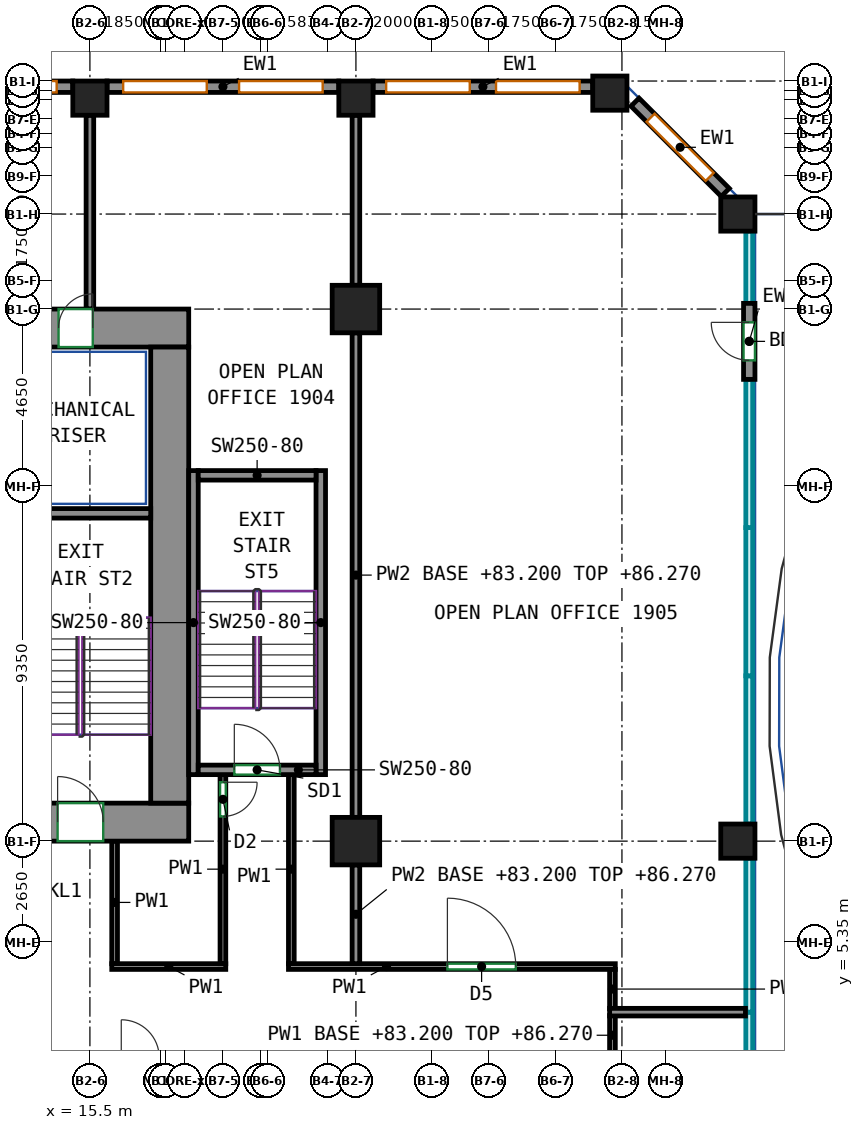
"""IFC4 building model, lengths in metres.
Left out: names, types, materials, properties, quantities, classifications, styles, units other than length and angle.
Written with IfcOpenShell. Run it as: python <this file> out.ifc"""

import sys

from ifc_helpers import new_model, si_unit, direction, frame, frame_2d, origin, origin_2d, place, context, subcontext, project, spatial, rectangle, extrude, source, transform, mapped, element, fill, save


model = new_model("IFC4")
c1 = context("Model", 3, precision=1e-05, world=origin(), true_north=direction((0.0, 1.0)))
c2 = subcontext(c1, "Body", "Model", "MODEL_VIEW")
j1 = project(units=[si_unit("LENGTHUNIT", "METRE"), si_unit("PLANEANGLEUNIT", "RADIAN")], contexts=[c1])
p1 = place(None, origin())
s1 = spatial("IfcSite", under=j1, at=p1, CompositionType="ELEMENT")
p2 = place(p1, origin())
s2 = spatial("IfcBuilding", under=s1, at=p2, CompositionType="ELEMENT")
p3 = place(p2, frame((0.0, 0.0, 83.2)))
s3 = spatial("IfcBuildingStorey", under=s2, at=p3, CompositionType="ELEMENT", Elevation=83.2)
m1 = source(origin(), c2, "Body", "SweptSolid", [
    extrude(rectangle(XDim=0.9, YDim=0.9, at=origin_2d()), origin(), (0.0, 0.0, 1.0), 3.72),
])
p4 = place(p3, frame((15.5, 27.55, 0.0), z_axis=(0.0, 0.0, 1.0), x_axis=(1.0, 0.0, 0.0)))
e1 = element("IfcColumn", 1, at=p4, inside=s3, PredefinedType="COLUMN", context=c2, shape_type="MappedRepresentation", body=[
    mapped(m1, transform((0.0, 0.0, 0.0))),
])
m2 = source(origin(), c2, "Body", "SweptSolid", [
    extrude(rectangle(XDim=1.25, YDim=1.25, at=origin_2d()), origin(), (0.0, 0.0, 1.0), 3.72),
])
for number, where, z_axis, x_axis in (
    (2, (22.5, 8.0, 0.0), (0.0, 0.0, 1.0), (1.0, 0.0, 0.0)),
    (3, (22.5, 22.0, 0.0), (0.0, 0.0, 1.0), (1.0, 0.0, 0.0)),
):
    element("IfcColumn", number, at=place(p3, frame(where, z_axis=z_axis, x_axis=x_axis)), inside=s3, PredefinedType="COLUMN", context=c2, shape_type="MappedRepresentation", body=[
        mapped(m2, transform((0.0, 0.0, 0.0))),
    ])
for number, where, z_axis, x_axis in (
    (4, (22.5, 27.55, 0.0), (0.0, 0.0, 1.0), (1.0, 0.0, 0.0)),
    (5, (29.182, 27.682, 0.0), (0.0, 0.0, 1.0), (1.0, 0.0, 0.0)),
    (6, (32.55, 8.0, 0.0), (0.0, 0.0, 1.0), (1.0, 0.0, 0.0)),
    (7, (32.55, 24.5, 0.0), (0.0, 0.0, 1.0), (1.0, 0.0, 0.0)),
):
    element("IfcColumn", number, at=place(p3, frame(where, z_axis=z_axis, x_axis=x_axis)), inside=s3, PredefinedType="COLUMN", context=c2, shape_type="MappedRepresentation", body=[
        mapped(m1, transform((0.0, 0.0, 0.0))),
    ])
m3 = source(origin(), c2, "Body", "SweptSolid", [
    extrude(rectangle(XDim=5.63, YDim=1.0, at=frame_2d((2.815, 0.0))), origin(), (0.0, 0.0, 1.0), 3.72),
])
p5 = place(p3, frame((12.47, 8.5, 0.0), z_axis=(0.0, 0.0, 1.0), x_axis=(1.0, 0.0, 0.0)))
e8 = element("IfcWall", 8, at=p5, inside=s3, PredefinedType="SHEAR", context=c2, shape_type="MappedRepresentation", body=[
    mapped(m3, transform((0.0, 0.0, 0.0))),
])
p6 = place(p5, frame((2.18, 0.0, 0.0)))
e9 = element("IfcOpeningElement", 9, at=p6, cuts=e8, PredefinedType="OPENING", context=c2, shape_type="SweptSolid", body=[
    extrude(rectangle(XDim=1.2, YDim=2.1, at=frame_2d((0.6, 1.05))), frame((0.0, 0.51, 0.0), z_axis=(0.0, -1.0, 0.0), x_axis=(1.0, 0.0, 0.0)), (0.0, 0.0, 1.0), 1.02),
])
m4 = source(origin(), c2, "Body", "SweptSolid", [
    extrude(rectangle(XDim=34.1, YDim=1.0, at=frame_2d((17.05, 0.0))), origin(), (0.0, 0.0, 1.0), 3.72),
])
p7 = place(p3, frame((-16.0, 21.5, 0.0), z_axis=(0.0, 0.0, 1.0), x_axis=(1.0, 0.0, 0.0)))
e10 = element("IfcWall", 10, at=p7, inside=s3, PredefinedType="SHEAR", context=c2, shape_type="MappedRepresentation", body=[
    mapped(m4, transform((0.0, 0.0, 0.0))),
])
p8 = place(p7, frame((6.831, 0.0, 0.0)))
e11 = element("IfcOpeningElement", 11, at=p8, cuts=e10, PredefinedType="OPENING", context=c2, shape_type="SweptSolid", body=[
    extrude(rectangle(XDim=0.9, YDim=2.1, at=frame_2d((0.45, 1.05))), frame((0.0, 0.51, 0.0), z_axis=(0.0, -1.0, 0.0), x_axis=(1.0, 0.0, 0.0)), (0.0, 0.0, 1.0), 1.02),
])
p9 = place(p7, frame((12.138, 0.0, 0.0)))
e12 = element("IfcOpeningElement", 12, at=p9, cuts=e10, PredefinedType="OPENING", context=c2, shape_type="SweptSolid", body=[
    extrude(rectangle(XDim=0.9, YDim=2.1, at=frame_2d((0.45, 1.05))), frame((0.0, 0.51, 0.0), z_axis=(0.0, -1.0, 0.0), x_axis=(1.0, 0.0, 0.0)), (0.0, 0.0, 1.0), 1.02),
])
p10 = place(p7, frame((17.565, 0.0, 0.0)))
e13 = element("IfcOpeningElement", 13, at=p10, cuts=e10, PredefinedType="OPENING", context=c2, shape_type="SweptSolid", body=[
    extrude(rectangle(XDim=0.9, YDim=2.1, at=frame_2d((0.45, 1.05))), frame((0.0, 0.51, 0.0), z_axis=(0.0, -1.0, 0.0), x_axis=(1.0, 0.0, 0.0)), (0.0, 0.0, 1.0), 1.02),
])
p11 = place(p7, frame((21.786, 0.0, 0.0)))
e14 = element("IfcOpeningElement", 14, at=p11, cuts=e10, PredefinedType="OPENING", context=c2, shape_type="SweptSolid", body=[
    extrude(rectangle(XDim=0.9, YDim=2.1, at=frame_2d((0.45, 1.05))), frame((0.0, 0.51, 0.0), z_axis=(0.0, -1.0, 0.0), x_axis=(1.0, 0.0, 0.0)), (0.0, 0.0, 1.0), 1.02),
])
p12 = place(p7, frame((26.127, 0.0, 0.0)))
e15 = element("IfcOpeningElement", 15, at=p12, cuts=e10, PredefinedType="OPENING", context=c2, shape_type="SweptSolid", body=[
    extrude(rectangle(XDim=0.9, YDim=2.1, at=frame_2d((0.45, 1.05))), frame((0.0, 0.51, 0.0), z_axis=(0.0, -1.0, 0.0), x_axis=(1.0, 0.0, 0.0)), (0.0, 0.0, 1.0), 1.02),
])
p13 = place(p7, frame((2.525, 0.0, 0.0)))
e16 = element("IfcOpeningElement", 16, at=p13, cuts=e10, PredefinedType="OPENING", context=c2, shape_type="SweptSolid", body=[
    extrude(rectangle(XDim=0.9, YDim=2.1, at=frame_2d((0.45, 1.05))), frame((0.0, 0.51, 0.0), z_axis=(0.0, -1.0, 0.0), x_axis=(1.0, 0.0, 0.0)), (0.0, 0.0, 1.0), 1.02),
])
p14 = place(p7, frame((30.675, 0.0, 0.0)))
e17 = element("IfcOpeningElement", 17, at=p14, cuts=e10, PredefinedType="OPENING", context=c2, shape_type="SweptSolid", body=[
    extrude(rectangle(XDim=0.9, YDim=2.1, at=frame_2d((0.45, 1.05))), frame((0.0, 0.51, 0.0), z_axis=(0.0, -1.0, 0.0), x_axis=(1.0, 0.0, 0.0)), (0.0, 0.0, 1.0), 1.02),
])
m5 = source(origin(), c2, "Body", "SweptSolid", [
    extrude(rectangle(XDim=12.0, YDim=1.0, at=frame_2d((6.0, 0.0))), origin(), (0.0, 0.0, 1.0), 3.72),
])
p15 = place(p3, frame((17.6, 9.0, 0.0), z_axis=(0.0, 0.0, 1.0), x_axis=(0.0, 1.0, 0.0)))
e18 = element("IfcWall", 18, at=p15, inside=s3, PredefinedType="SHEAR", context=c2, shape_type="MappedRepresentation", body=[
    mapped(m5, transform((0.0, 0.0, 0.0))),
])
m6 = source(origin(), c2, "Body", "SweptSolid", [
    extrude(rectangle(XDim=3.7, YDim=0.25, at=frame_2d((1.85, 0.0))), origin(), (0.0, 0.0, 1.0), 3.72),
])
p16 = place(p3, frame((13.4, 16.625, 0.0), z_axis=(0.0, 0.0, 1.0), x_axis=(1.0, 0.0, 0.0)))
e19 = element("IfcWall", 19, at=p16, inside=s3, PredefinedType="SHEAR", context=c2, shape_type="MappedRepresentation", body=[
    mapped(m6, transform((0.0, 0.0, 0.0))),
])
m7 = source(origin(), c2, "Body", "SweptSolid", [
    extrude(rectangle(XDim=8.0, YDim=0.25, at=frame_2d((4.0, 0.0))), origin(), (0.0, 0.0, 1.0), 3.72),
])
for number, where, z_axis, x_axis in (
    (20, (18.225, 9.75, 0.0), (0.0, 0.0, 1.0), (0.0, 1.0, 0.0)),
    (21, (21.575, 9.75, 0.0), (0.0, 0.0, 1.0), (0.0, 1.0, 0.0)),
):
    element("IfcWall", number, at=place(p3, frame(where, z_axis=z_axis, x_axis=x_axis)), inside=s3, PredefinedType="SHEAR", context=c2, shape_type="MappedRepresentation", body=[
        mapped(m7, transform((0.0, 0.0, 0.0))),
    ])
m8 = source(origin(), c2, "Body", "SweptSolid", [
    extrude(rectangle(XDim=3.1, YDim=0.25, at=frame_2d((1.55, 0.0))), origin(), (0.0, 0.0, 1.0), 3.72),
])
p17 = place(p3, frame((18.35, 9.875, 0.0), z_axis=(0.0, 0.0, 1.0), x_axis=(1.0, 0.0, 0.0)))
e22 = element("IfcWall", 22, at=p17, inside=s3, PredefinedType="SHEAR", context=c2, shape_type="MappedRepresentation", body=[
    mapped(m8, transform((0.0, 0.0, 0.0))),
])
p18 = place(p17, frame((0.95, 0.0, 0.0)))
e23 = element("IfcOpeningElement", 23, at=p18, cuts=e22, PredefinedType="OPENING", context=c2, shape_type="SweptSolid", body=[
    extrude(rectangle(XDim=1.2, YDim=2.1, at=frame_2d((0.6, 1.05))), frame((0.0, 0.135, 0.0), z_axis=(0.0, -1.0, 0.0), x_axis=(1.0, 0.0, 0.0)), (0.0, 0.0, 1.0), 0.27),
])
p19 = place(p3, frame((18.35, 17.625, 0.0), z_axis=(0.0, 0.0, 1.0), x_axis=(1.0, 0.0, 0.0)))
e24 = element("IfcWall", 24, at=p19, inside=s3, PredefinedType="SHEAR", context=c2, shape_type="MappedRepresentation", body=[
    mapped(m8, transform((0.0, 0.0, 0.0))),
])
m9 = source(origin(), c2, "Body", "SweptSolid", [
    extrude(rectangle(XDim=2.0, YDim=0.3, at=frame_2d((1.0, 0.0))), origin(), (0.0, 0.0, 1.0), 3.72),
])
p20 = place(p3, frame((32.85, 20.15, 0.0), z_axis=(0.0, 0.0, 1.0), x_axis=(0.0, 1.0, 0.0)))
e25 = element("IfcWall", 25, at=p20, inside=s3, PredefinedType="SOLIDWALL", context=c2, shape_type="MappedRepresentation", body=[
    mapped(m9, transform((0.0, 0.0, 0.0))),
])
p21 = place(p20, frame((0.5, 0.0, 0.0)))
e26 = element("IfcOpeningElement", 26, at=p21, cuts=e25, PredefinedType="OPENING", context=c2, shape_type="SweptSolid", body=[
    extrude(rectangle(XDim=1.0, YDim=2.1, at=frame_2d((0.5, 1.05))), frame((0.0, 0.16, 0.0), z_axis=(0.0, -1.0, 0.0), x_axis=(1.0, 0.0, 0.0)), (0.0, 0.0, 1.0), 0.32),
])
m10 = source(origin(), c2, "Body", "SweptSolid", [
    extrude(rectangle(XDim=3.359, YDim=0.3, at=frame_2d((1.679, 0.0))), origin(), (0.0, 0.0, 1.0), 3.72),
])
p22 = place(p3, frame((32.219, 25.069, 0.0), z_axis=(0.0, 0.0, 1.0), x_axis=(-0.707070438228, 0.707143122278, 0.0)))
e27 = element("IfcWall", 27, at=p22, inside=s3, PredefinedType="SOLIDWALL", context=c2, shape_type="MappedRepresentation", body=[
    mapped(m10, transform((0.0, 0.0, 0.0))),
])
p23 = place(p22, frame((0.579, 0.0, 0.7)))
e28 = element("IfcOpeningElement", 28, at=p23, cuts=e27, PredefinedType="OPENING", context=c2, shape_type="SweptSolid", body=[
    extrude(rectangle(XDim=2.2, YDim=2.25, at=frame_2d((1.1, 1.125))), frame((0.0, 0.16, 0.0), z_axis=(0.0, -1.0, 0.0), x_axis=(1.0, 0.0, 0.0)), (0.0, 0.0, 1.0), 0.32),
])
m11 = source(origin(), c2, "Body", "SweptSolid", [
    extrude(rectangle(XDim=5.782, YDim=0.3, at=frame_2d((2.891, 0.0))), origin(), (0.0, 0.0, 1.0), 3.72),
])
p24 = place(p3, frame((28.732, 27.85, 0.0), z_axis=(0.0, 0.0, 1.0), x_axis=(-1.0, 0.0, 0.0)))
e29 = element("IfcWall", 29, at=p24, inside=s3, PredefinedType="SOLIDWALL", context=c2, shape_type="MappedRepresentation", body=[
    mapped(m11, transform((0.0, 0.0, 0.0))),
])
p25 = place(p24, frame((0.345, 0.0, 0.7)))
e30 = element("IfcOpeningElement", 30, at=p25, cuts=e29, PredefinedType="OPENING", context=c2, shape_type="SweptSolid", body=[
    extrude(rectangle(XDim=2.2, YDim=2.25, at=frame_2d((1.1, 1.125))), frame((0.0, 0.16, 0.0), z_axis=(0.0, -1.0, 0.0), x_axis=(1.0, 0.0, 0.0)), (0.0, 0.0, 1.0), 0.32),
])
p26 = place(p24, frame((3.236, 0.0, 0.7)))
e31 = element("IfcOpeningElement", 31, at=p26, cuts=e29, PredefinedType="OPENING", context=c2, shape_type="SweptSolid", body=[
    extrude(rectangle(XDim=2.2, YDim=2.25, at=frame_2d((1.1, 1.125))), frame((0.0, 0.16, 0.0), z_axis=(0.0, -1.0, 0.0), x_axis=(1.0, 0.0, 0.0)), (0.0, 0.0, 1.0), 0.32),
])
m12 = source(origin(), c2, "Body", "SweptSolid", [
    extrude(rectangle(XDim=6.1, YDim=0.3, at=frame_2d((3.05, 0.0))), origin(), (0.0, 0.0, 1.0), 3.72),
])
p27 = place(p3, frame((22.05, 27.85, 0.0), z_axis=(0.0, 0.0, 1.0), x_axis=(-1.0, 0.0, 0.0)))
e32 = element("IfcWall", 32, at=p27, inside=s3, PredefinedType="SOLIDWALL", context=c2, shape_type="MappedRepresentation", body=[
    mapped(m12, transform((0.0, 0.0, 0.0))),
])
p28 = place(p27, frame((0.425, 0.0, 0.7)))
e33 = element("IfcOpeningElement", 33, at=p28, cuts=e32, PredefinedType="OPENING", context=c2, shape_type="SweptSolid", body=[
    extrude(rectangle(XDim=2.2, YDim=2.25, at=frame_2d((1.1, 1.125))), frame((0.0, 0.16, 0.0), z_axis=(0.0, -1.0, 0.0), x_axis=(1.0, 0.0, 0.0)), (0.0, 0.0, 1.0), 0.32),
])
p29 = place(p27, frame((3.475, 0.0, 0.7)))
e34 = element("IfcOpeningElement", 34, at=p29, cuts=e32, PredefinedType="OPENING", context=c2, shape_type="SweptSolid", body=[
    extrude(rectangle(XDim=2.2, YDim=2.25, at=frame_2d((1.1, 1.125))), frame((0.0, 0.16, 0.0), z_axis=(0.0, -1.0, 0.0), x_axis=(1.0, 0.0, 0.0)), (0.0, 0.0, 1.0), 0.32),
])
p30 = place(p3, frame((15.05, 27.85, 0.0), z_axis=(0.0, 0.0, 1.0), x_axis=(-1.0, 0.0, 0.0)))
e35 = element("IfcWall", 35, at=p30, inside=s3, PredefinedType="SOLIDWALL", context=c2, shape_type="MappedRepresentation", body=[
    mapped(m12, transform((0.0, 0.0, 0.0))),
])
p31 = place(p30, frame((0.425, 0.0, 0.7)))
e36 = element("IfcOpeningElement", 36, at=p31, cuts=e35, PredefinedType="OPENING", context=c2, shape_type="SweptSolid", body=[
    extrude(rectangle(XDim=2.2, YDim=2.25, at=frame_2d((1.1, 1.125))), frame((0.0, 0.16, 0.0), z_axis=(0.0, -1.0, 0.0), x_axis=(1.0, 0.0, 0.0)), (0.0, 0.0, 1.0), 0.32),
])
p32 = place(p30, frame((3.475, 0.0, 0.7)))
e37 = element("IfcOpeningElement", 37, at=p32, cuts=e35, PredefinedType="OPENING", context=c2, shape_type="SweptSolid", body=[
    extrude(rectangle(XDim=2.2, YDim=2.25, at=frame_2d((1.1, 1.125))), frame((0.0, 0.16, 0.0), z_axis=(0.0, -1.0, 0.0), x_axis=(1.0, 0.0, 0.0)), (0.0, 0.0, 1.0), 0.32),
])
p33 = place(p3, frame((16.15, 4.775, 0.0), z_axis=(0.0, 0.0, 1.0), x_axis=(0.0, 1.0, 0.0)))
e38 = element("IfcWall", 38, at=p33, inside=s3, PredefinedType="PARTITIONING", context=c2, shape_type="SweptSolid", body=[
    extrude(rectangle(XDim=3.225, YDim=0.15, at=frame_2d((1.613, 0.0))), origin(), (0.0, 0.0, 1.0), 3.72),
])
p34 = place(p3, frame((16.075, 4.7, 0.0), z_axis=(0.0, 0.0, 1.0), x_axis=(1.0, 0.0, 0.0)))
e39 = element("IfcWall", 39, at=p34, inside=s3, PredefinedType="PARTITIONING", context=c2, shape_type="SweptSolid", body=[
    extrude(rectangle(XDim=3.0, YDim=0.15, at=frame_2d((1.5, 0.0))), origin(), (0.0, 0.0, 1.0), 3.72),
])
p35 = place(p3, frame((19.0, 9.75, 0.0), z_axis=(0.0, 0.0, 1.0), x_axis=(0.0, -1.0, 0.0)))
e40 = element("IfcWall", 40, at=p35, inside=s3, PredefinedType="PARTITIONING", context=c2, shape_type="SweptSolid", body=[
    extrude(rectangle(XDim=4.975, YDim=0.15, at=frame_2d((2.488, 0.0))), origin(), (0.0, 0.0, 1.0), 3.72),
])
p36 = place(p35, frame((0.2, 0.0, 0.0)))
e41 = element("IfcOpeningElement", 41, at=p36, cuts=e40, PredefinedType="OPENING", context=c2, shape_type="SweptSolid", body=[
    extrude(rectangle(XDim=0.9, YDim=2.1, at=frame_2d((0.45, 1.05))), frame((0.0, 0.085, 0.0), z_axis=(0.0, -1.0, 0.0), x_axis=(1.0, 0.0, 0.0)), (0.0, 0.0, 1.0), 0.17),
])
p37 = place(p3, frame((20.8, 4.775, 0.0), z_axis=(0.0, 0.0, 1.0), x_axis=(0.0, 1.0, 0.0)))
e42 = element("IfcWall", 42, at=p37, inside=s3, PredefinedType="PARTITIONING", context=c2, shape_type="SweptSolid", body=[
    extrude(rectangle(XDim=4.975, YDim=0.15, at=frame_2d((2.488, 0.0))), origin(), (0.0, 0.0, 1.0), 3.72),
])
p38 = place(p3, frame((20.725, 4.7, 0.0), z_axis=(0.0, 0.0, 1.0), x_axis=(1.0, 0.0, 0.0)))
e43 = element("IfcWall", 43, at=p38, inside=s3, PredefinedType="PARTITIONING", context=c2, shape_type="SweptSolid", body=[
    extrude(rectangle(XDim=8.6, YDim=0.15, at=frame_2d((4.3, 0.0))), origin(), (0.0, 0.0, 1.0), 3.72),
])
p39 = place(p38, frame((4.182, 0.0, 0.0)))
e44 = element("IfcOpeningElement", 44, at=p39, cuts=e43, PredefinedType="OPENING", context=c2, shape_type="SweptSolid", body=[
    extrude(rectangle(XDim=1.8, YDim=2.1, at=frame_2d((0.9, 1.05))), frame((0.0, 0.085, 0.0), z_axis=(0.0, -1.0, 0.0), x_axis=(1.0, 0.0, 0.0)), (0.0, 0.0, 1.0), 0.17),
])
for number, where, z_axis, x_axis in (
    (45, (29.25, 3.59, 0.0), (0.0, 0.0, 1.0), (0.0, 1.0, 0.0)),
    (46, (29.25, 2.375, 0.0), (0.0, 0.0, 1.0), (0.0, 1.0, 0.0)),
):
    element("IfcWall", number, at=place(p3, frame(where, z_axis=z_axis, x_axis=x_axis)), inside=s3, PredefinedType="PARTITIONING", context=c2, shape_type="SweptSolid", body=[
        extrude(rectangle(XDim=1.035, YDim=0.15, at=frame_2d((0.518, 0.0))), origin(), (0.0, 0.0, 1.0), 3.07),
    ])
p40 = place(p3, frame((15.5, 22.0, 0.0), z_axis=(0.0, 0.0, 1.0), x_axis=(0.0, 1.0, 0.0)))
e47 = element("IfcWall", 47, at=p40, inside=s3, PredefinedType="PARTITIONING", context=c2, shape_type="SweptSolid", body=[
    extrude(rectangle(XDim=5.1, YDim=0.2, at=frame_2d((2.55, 0.0))), origin(), (0.0, 0.0, 1.0), 3.72),
])
p41 = place(p3, frame((22.5, 22.625, 0.0), z_axis=(0.0, 0.0, 1.0), x_axis=(0.0, 1.0, 0.0)))
e48 = element("IfcWall", 48, at=p41, inside=s3, PredefinedType="PARTITIONING", context=c2, shape_type="SweptSolid", body=[
    extrude(rectangle(XDim=4.475, YDim=0.2, at=frame_2d((2.238, 0.0))), origin(), (0.0, 0.0, 1.0), 3.72),
])
p42 = place(p3, frame((22.5, 8.625, 0.0), z_axis=(0.0, 0.0, 1.0), x_axis=(0.0, 1.0, 0.0)))
e49 = element("IfcWall", 49, at=p42, inside=s3, PredefinedType="PARTITIONING", context=c2, shape_type="SweptSolid", body=[
    extrude(rectangle(XDim=12.75, YDim=0.2, at=frame_2d((6.375, 0.0))), origin(), (0.0, 0.0, 1.0), 3.07),
])
p43 = place(p3, frame((22.5, 4.776, 0.0), z_axis=(0.0, 0.0, 1.0), x_axis=(0.0, 1.0, 0.0)))
e50 = element("IfcWall", 50, at=p43, inside=s3, PredefinedType="PARTITIONING", context=c2, shape_type="SweptSolid", body=[
    extrude(rectangle(XDim=2.599, YDim=0.2, at=frame_2d((1.3, 0.0))), origin(), (0.0, 0.0, 1.0), 3.07),
])
p44 = place(p3, frame((29.176, 3.5, 0.0), z_axis=(0.0, 0.0, 1.0), x_axis=(1.0, 0.0, 0.0)))
e51 = element("IfcWall", 51, at=p44, inside=s3, PredefinedType="PARTITIONING", context=c2, shape_type="SweptSolid", body=[
    extrude(rectangle(XDim=3.574, YDim=0.2, at=frame_2d((1.787, 0.0))), origin(), (0.0, 0.0, 1.0), 3.72),
])
p45 = place(p21, origin())
e52 = element("IfcDoor", 52, at=p45, inside=s3, OperationType="SINGLE_SWING_RIGHT", PredefinedType="DOOR", context=c2, shape_type="SweptSolid", body=[
    extrude(rectangle(XDim=1.0, YDim=2.1, at=frame_2d((0.5, 1.05))), frame((0.0, 0.025, 0.0), z_axis=(0.0, -1.0, 0.0), x_axis=(1.0, 0.0, 0.0)), (0.0, 0.0, 1.0), 0.05),
])
fill(e26, e52)
p46 = place(p23, origin())
e53 = element("IfcWindow", 53, at=p46, inside=s3, PartitioningType="SINGLE_PANEL", PredefinedType="WINDOW", context=c2, shape_type="SweptSolid", body=[
    extrude(rectangle(XDim=2.2, YDim=2.25, at=frame_2d((1.1, 1.125))), frame((0.0, 0.03, 0.0), z_axis=(0.0, -1.0, 0.0), x_axis=(1.0, 0.0, 0.0)), (0.0, 0.0, 1.0), 0.06),
])
fill(e28, e53)
p47 = place(p25, origin())
e54 = element("IfcWindow", 54, at=p47, inside=s3, PartitioningType="SINGLE_PANEL", PredefinedType="WINDOW", context=c2, shape_type="SweptSolid", body=[
    extrude(rectangle(XDim=2.2, YDim=2.25, at=frame_2d((1.1, 1.125))), frame((0.0, 0.03, 0.0), z_axis=(0.0, -1.0, 0.0), x_axis=(1.0, 0.0, 0.0)), (0.0, 0.0, 1.0), 0.06),
])
fill(e30, e54)
p48 = place(p26, origin())
e55 = element("IfcWindow", 55, at=p48, inside=s3, PartitioningType="SINGLE_PANEL", PredefinedType="WINDOW", context=c2, shape_type="SweptSolid", body=[
    extrude(rectangle(XDim=2.2, YDim=2.25, at=frame_2d((1.1, 1.125))), frame((0.0, 0.03, 0.0), z_axis=(0.0, -1.0, 0.0), x_axis=(1.0, 0.0, 0.0)), (0.0, 0.0, 1.0), 0.06),
])
fill(e31, e55)
p49 = place(p28, origin())
e56 = element("IfcWindow", 56, at=p49, inside=s3, PartitioningType="SINGLE_PANEL", PredefinedType="WINDOW", context=c2, shape_type="SweptSolid", body=[
    extrude(rectangle(XDim=2.2, YDim=2.25, at=frame_2d((1.1, 1.125))), frame((0.0, 0.03, 0.0), z_axis=(0.0, -1.0, 0.0), x_axis=(1.0, 0.0, 0.0)), (0.0, 0.0, 1.0), 0.06),
])
fill(e33, e56)
p50 = place(p29, origin())
e57 = element("IfcWindow", 57, at=p50, inside=s3, PartitioningType="SINGLE_PANEL", PredefinedType="WINDOW", context=c2, shape_type="SweptSolid", body=[
    extrude(rectangle(XDim=2.2, YDim=2.25, at=frame_2d((1.1, 1.125))), frame((0.0, 0.03, 0.0), z_axis=(0.0, -1.0, 0.0), x_axis=(1.0, 0.0, 0.0)), (0.0, 0.0, 1.0), 0.06),
])
fill(e34, e57)
p51 = place(p31, origin())
e58 = element("IfcWindow", 58, at=p51, inside=s3, PartitioningType="SINGLE_PANEL", PredefinedType="WINDOW", context=c2, shape_type="SweptSolid", body=[
    extrude(rectangle(XDim=2.2, YDim=2.25, at=frame_2d((1.1, 1.125))), frame((0.0, 0.03, 0.0), z_axis=(0.0, -1.0, 0.0), x_axis=(1.0, 0.0, 0.0)), (0.0, 0.0, 1.0), 0.06),
])
fill(e36, e58)
p52 = place(p14, origin())
e59 = element("IfcDoor", 59, at=p52, inside=s3, OperationType="SINGLE_SWING_RIGHT", PredefinedType="DOOR", context=c2, shape_type="SweptSolid", body=[
    extrude(rectangle(XDim=0.9, YDim=2.1, at=frame_2d((0.45, 1.05))), frame((0.0, -0.355, 0.0), z_axis=(0.0, -1.0, 0.0), x_axis=(1.0, 0.0, 0.0)), (0.0, 0.0, 1.0), 0.05),
])
fill(e17, e59)
p53 = place(p6, origin())
e60 = element("IfcDoor", 60, at=p53, inside=s3, OperationType="DOUBLE_DOOR_SINGLE_SWING", PredefinedType="DOOR", context=c2, shape_type="SweptSolid", body=[
    extrude(rectangle(XDim=1.2, YDim=2.1, at=frame_2d((0.6, 1.05))), frame((0.0, 0.405, 0.0), z_axis=(0.0, -1.0, 0.0), x_axis=(1.0, 0.0, 0.0)), (0.0, 0.0, 1.0), 0.05),
])
fill(e9, e60)
p54 = place(p18, origin())
e61 = element("IfcDoor", 61, at=p54, inside=s3, OperationType="DOUBLE_DOOR_SINGLE_SWING", PredefinedType="DOOR", context=c2, shape_type="SweptSolid", body=[
    extrude(rectangle(XDim=1.2, YDim=2.1, at=frame_2d((0.6, 1.05))), frame((0.0, 0.025, 0.0), z_axis=(0.0, -1.0, 0.0), x_axis=(1.0, 0.0, 0.0)), (0.0, 0.0, 1.0), 0.05),
])
fill(e23, e61)
p55 = place(p39, origin())
e62 = element("IfcDoor", 62, at=p55, inside=s3, OperationType="DOUBLE_DOOR_SINGLE_SWING", PredefinedType="DOOR", context=c2, shape_type="SweptSolid", body=[
    extrude(rectangle(XDim=1.8, YDim=2.1, at=frame_2d((0.9, 1.05))), frame((0.0, 0.025, 0.0), z_axis=(0.0, -1.0, 0.0), x_axis=(1.0, 0.0, 0.0)), (0.0, 0.0, 1.0), 0.05),
])
fill(e44, e62)
p56 = place(p36, origin())
e63 = element("IfcDoor", 63, at=p56, inside=s3, OperationType="SINGLE_SWING_LEFT", PredefinedType="DOOR", context=c2, shape_type="SweptSolid", body=[
    extrude(rectangle(XDim=0.9, YDim=2.1, at=frame_2d((0.45, 1.05))), frame((0.0, 0.025, 0.0), z_axis=(0.0, -1.0, 0.0), x_axis=(1.0, 0.0, 0.0)), (0.0, 0.0, 1.0), 0.05),
])
fill(e41, e63)
save(model, sys.argv[1])
